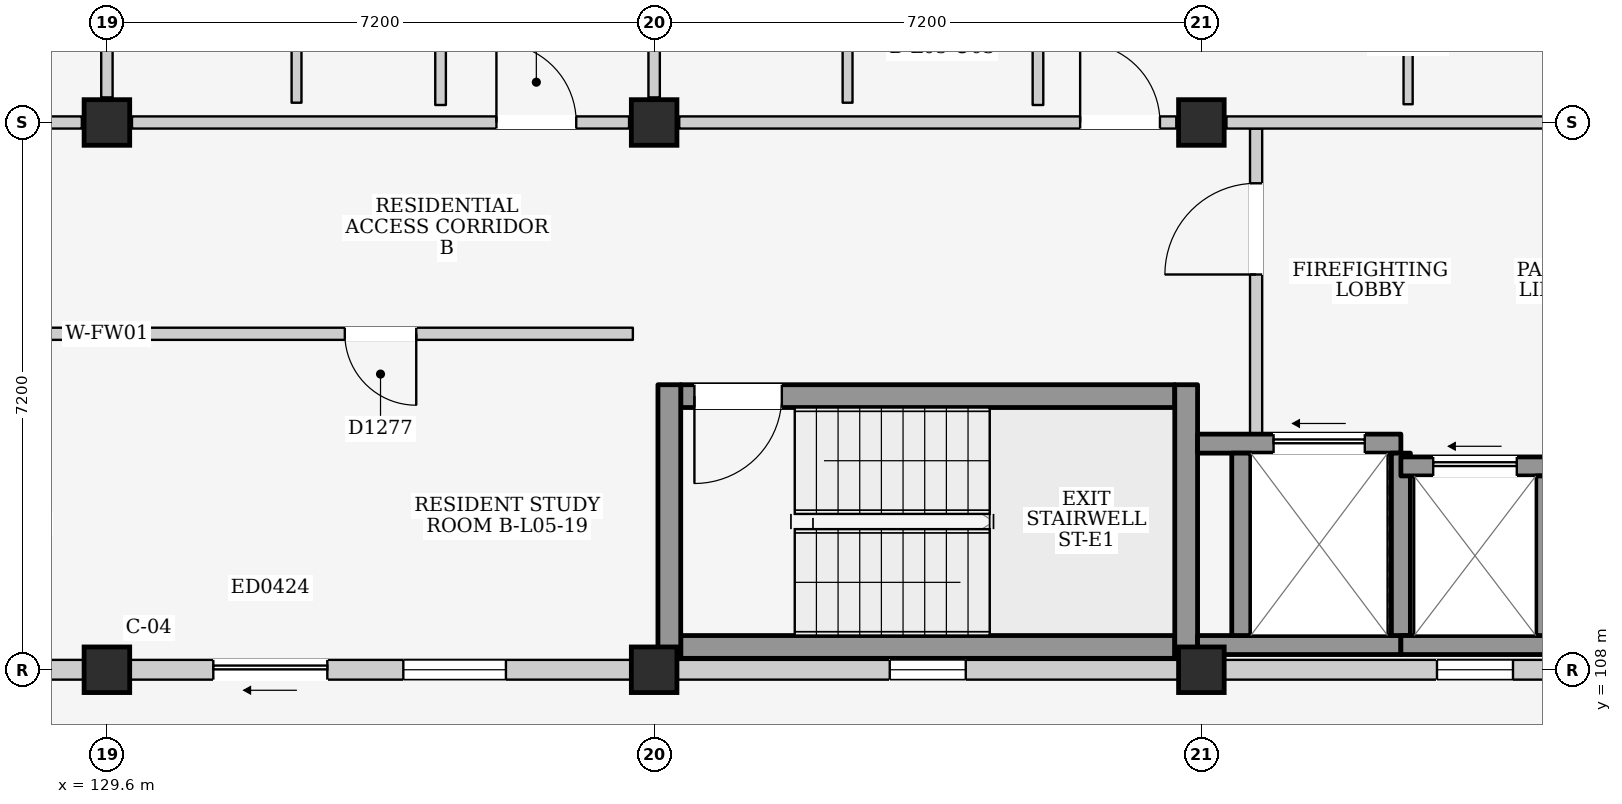
"""IFC4 building model, lengths in metres.
Left out: names, types, materials, properties, quantities, classifications, styles, units other than length and angle.
Written with IfcOpenShell. Run it as: python <this file> out.ifc"""

import sys

from ifc_helpers import new_model, si_unit, direction, frame, frame_2d, origin, origin_2d, place, context, subcontext, project, spatial, rectangle, extrude, element, fill, save


model = new_model("IFC4")
c1 = context("Model", 3, precision=1e-05, world=origin(), true_north=direction((0.0, 1.0)))
c2 = subcontext(c1, "Body", "Model", "MODEL_VIEW")
j1 = project(units=[si_unit("LENGTHUNIT", "METRE"), si_unit("PLANEANGLEUNIT", "RADIAN")], contexts=[c1])
p1 = place(None, origin())
s1 = spatial("IfcSite", under=j1, at=p1, CompositionType="ELEMENT")
p2 = place(p1, origin())
s2 = spatial("IfcBuilding", under=s1, at=p2, CompositionType="ELEMENT")
p3 = place(p2, frame((0.0, 0.0, 18.6)))
s3 = spatial("IfcBuildingStorey", under=s2, at=p3, CompositionType="ELEMENT", Elevation=18.6)
for number, where, z_axis, x_axis in (
    (1, (129.6, 108.0, 0.0), (0.0, 0.0, 1.0), (1.0, 0.0, 0.0)),
    (2, (129.6, 115.2, 0.0), (0.0, 0.0, 1.0), (1.0, 0.0, 0.0)),
    (3, (136.8, 108.0, 0.0), (0.0, 0.0, 1.0), (1.0, 0.0, 0.0)),
    (4, (136.8, 115.2, 0.0), (0.0, 0.0, 1.0), (1.0, 0.0, 0.0)),
    (5, (144.0, 108.0, 0.0), (0.0, 0.0, 1.0), (1.0, 0.0, 0.0)),
    (6, (144.0, 115.2, 0.0), (0.0, 0.0, 1.0), (1.0, 0.0, 0.0)),
):
    element("IfcColumn", number, at=place(p3, frame(where, z_axis=z_axis, x_axis=x_axis)), inside=s3, PredefinedType="COLUMN", context=c2, shape_type="SweptSolid", body=[
        extrude(rectangle(XDim=0.6, YDim=0.6, at=origin_2d()), origin(), (0.0, 0.0, 1.0), 3.3),
    ])
p4 = place(p3, frame((122.7, 108.0, 0.0), z_axis=(0.0, 0.0, 1.0), x_axis=(1.0, 0.0, 0.0)))
e7 = element("IfcWall", 7, at=p4, inside=s3, PredefinedType="ELEMENTEDWALL", context=c2, shape_type="SweptSolid", body=[
    extrude(rectangle(XDim=6.6, YDim=0.26, at=frame_2d((3.3, 0.0))), origin(), (0.0, 0.0, 1.0), 2.445),
])
p5 = place(p4, frame((1.1, 0.0, 0.0)))
e8 = element("IfcOpeningElement", 8, at=p5, cuts=e7, PredefinedType="OPENING", context=c2, shape_type="SweptSolid", body=[
    extrude(rectangle(XDim=1.5, YDim=2.12, at=frame_2d((0.75, 1.06))), frame((0.0, 0.145, 0.0), z_axis=(0.0, -1.0, 0.0), x_axis=(1.0, 0.0, 0.0)), (0.0, 0.0, 1.0), 0.29),
])
p6 = place(p4, frame((3.6, 0.0, 0.835)))
e9 = element("IfcOpeningElement", 9, at=p6, cuts=e7, PredefinedType="OPENING", context=c2, shape_type="SweptSolid", body=[
    extrude(rectangle(XDim=1.35, YDim=1.5, at=frame_2d((0.675, 0.75))), frame((0.0, 0.145, 0.0), z_axis=(0.0, -1.0, 0.0), x_axis=(1.0, 0.0, 0.0)), (0.0, 0.0, 1.0), 0.29),
])
p7 = place(p3, frame((129.9, 108.0, 0.0), z_axis=(0.0, 0.0, 1.0), x_axis=(1.0, 0.0, 0.0)))
e10 = element("IfcWall", 10, at=p7, inside=s3, PredefinedType="ELEMENTEDWALL", context=c2, shape_type="SweptSolid", body=[
    extrude(rectangle(XDim=6.6, YDim=0.26, at=frame_2d((3.3, 0.0))), origin(), (0.0, 0.0, 1.0), 2.445),
])
p8 = place(p7, frame((1.1, 0.0, 0.0)))
e11 = element("IfcOpeningElement", 11, at=p8, cuts=e10, PredefinedType="OPENING", context=c2, shape_type="SweptSolid", body=[
    extrude(rectangle(XDim=1.5, YDim=2.12, at=frame_2d((0.75, 1.06))), frame((0.0, 0.145, 0.0), z_axis=(0.0, -1.0, 0.0), x_axis=(1.0, 0.0, 0.0)), (0.0, 0.0, 1.0), 0.29),
])
p9 = place(p7, frame((3.6, 0.0, 0.835)))
e12 = element("IfcOpeningElement", 12, at=p9, cuts=e10, PredefinedType="OPENING", context=c2, shape_type="SweptSolid", body=[
    extrude(rectangle(XDim=1.35, YDim=1.5, at=frame_2d((0.675, 0.75))), frame((0.0, 0.145, 0.0), z_axis=(0.0, -1.0, 0.0), x_axis=(1.0, 0.0, 0.0)), (0.0, 0.0, 1.0), 0.29),
])
p10 = place(p3, frame((137.1, 108.0, 0.0), z_axis=(0.0, 0.0, 1.0), x_axis=(1.0, 0.0, 0.0)))
e13 = element("IfcWall", 13, at=p10, inside=s3, PredefinedType="ELEMENTEDWALL", context=c2, shape_type="SweptSolid", body=[
    extrude(rectangle(XDim=6.6, YDim=0.26, at=frame_2d((3.3, 0.0))), origin(), (0.0, 0.0, 1.0), 2.445),
])
p11 = place(p10, frame((2.8, 0.0, 1.2)))
e14 = element("IfcOpeningElement", 14, at=p11, cuts=e13, PredefinedType="OPENING", context=c2, shape_type="SweptSolid", body=[
    extrude(rectangle(XDim=1.0, YDim=0.9, at=frame_2d((0.5, 0.45))), frame((0.0, 0.145, 0.0), z_axis=(0.0, -1.0, 0.0), x_axis=(1.0, 0.0, 0.0)), (0.0, 0.0, 1.0), 0.29),
])
p12 = place(p3, frame((144.3, 108.0, 0.0), z_axis=(0.0, 0.0, 1.0), x_axis=(1.0, 0.0, 0.0)))
e15 = element("IfcWall", 15, at=p12, inside=s3, PredefinedType="ELEMENTEDWALL", context=c2, shape_type="SweptSolid", body=[
    extrude(rectangle(XDim=6.6, YDim=0.26, at=frame_2d((3.3, 0.0))), origin(), (0.0, 0.0, 1.0), 2.445),
])
p13 = place(p12, frame((2.8, 0.0, 1.2)))
e16 = element("IfcOpeningElement", 16, at=p13, cuts=e15, PredefinedType="OPENING", context=c2, shape_type="SweptSolid", body=[
    extrude(rectangle(XDim=1.0, YDim=0.9, at=frame_2d((0.5, 0.45))), frame((0.0, 0.145, 0.0), z_axis=(0.0, -1.0, 0.0), x_axis=(1.0, 0.0, 0.0)), (0.0, 0.0, 1.0), 0.29),
])
p14 = place(p3, frame((137.15, 108.3, 0.0), z_axis=(0.0, 0.0, 1.0), x_axis=(1.0, 0.0, 0.0)))
e17 = element("IfcWall", 17, at=p14, inside=s3, PredefinedType="SHEAR", context=c2, shape_type="SweptSolid", body=[
    extrude(rectangle(XDim=6.5, YDim=0.3, at=frame_2d((3.25, 0.0))), origin(), (0.0, 0.0, 1.0), 3.06),
])
p15 = place(p3, frame((137.15, 111.6, 0.0), z_axis=(0.0, 0.0, 1.0), x_axis=(1.0, 0.0, 0.0)))
e18 = element("IfcWall", 18, at=p15, inside=s3, PredefinedType="SHEAR", context=c2, shape_type="SweptSolid", body=[
    extrude(rectangle(XDim=6.5, YDim=0.3, at=frame_2d((3.25, 0.0))), origin(), (0.0, 0.0, 1.0), 3.06),
])
p16 = place(p15, frame((0.18, 0.0, 0.0)))
e19 = element("IfcOpeningElement", 19, at=p16, cuts=e18, PredefinedType="OPENING", context=c2, shape_type="SweptSolid", body=[
    extrude(rectangle(XDim=1.15, YDim=2.2, at=frame_2d((0.575, 1.1))), frame((0.0, 0.165, 0.0), z_axis=(0.0, -1.0, 0.0), x_axis=(1.0, 0.0, 0.0)), (0.0, 0.0, 1.0), 0.33),
])
for number, where, z_axis, x_axis in (
    (20, (137.0, 108.15, 0.0), (0.0, 0.0, 1.0), (0.0, 1.0, 0.0)),
    (21, (143.8, 108.15, 0.0), (0.0, 0.0, 1.0), (0.0, 1.0, 0.0)),
):
    element("IfcWall", number, at=place(p3, frame(where, z_axis=z_axis, x_axis=x_axis)), inside=s3, PredefinedType="SHEAR", context=c2, shape_type="SweptSolid", body=[
        extrude(rectangle(XDim=3.6, YDim=0.3, at=frame_2d((1.8, 0.0))), origin(), (0.0, 0.0, 1.0), 3.06),
    ])
p17 = place(p3, frame((144.72, 111.1, 0.0), z_axis=(0.0, 0.0, 1.0), x_axis=(0.0, 1.0, 0.0)))
e22 = element("IfcWall", 22, at=p17, inside=s3, PredefinedType="PARTITIONING", context=c2, shape_type="SweptSolid", body=[
    extrude(rectangle(XDim=4.02, YDim=0.16, at=frame_2d((2.01, 0.0))), origin(), (0.0, 0.0, 1.0), 3.06),
])
p18 = place(p17, frame((2.1, 0.0, 0.0)))
e23 = element("IfcOpeningElement", 23, at=p18, cuts=e22, PredefinedType="OPENING", context=c2, shape_type="SweptSolid", body=[
    extrude(rectangle(XDim=1.2, YDim=2.2, at=frame_2d((0.6, 1.1))), frame((0.0, 0.095, 0.0), z_axis=(0.0, -1.0, 0.0), x_axis=(1.0, 0.0, 0.0)), (0.0, 0.0, 1.0), 0.19),
])
p19 = place(p3, frame((143.95, 108.325, 0.0), z_axis=(0.0, 0.0, 1.0), x_axis=(1.0, 0.0, 0.0)))
e24 = element("IfcWall", 24, at=p19, inside=s3, PredefinedType="SHEAR", context=c2, shape_type="SweptSolid", body=[
    extrude(rectangle(XDim=2.675, YDim=0.25, at=frame_2d((1.337, 0.0))), origin(), (0.0, 0.0, 1.0), 3.06),
])
p20 = place(p3, frame((143.95, 110.975, 0.0), z_axis=(0.0, 0.0, 1.0), x_axis=(1.0, 0.0, 0.0)))
e25 = element("IfcWall", 25, at=p20, inside=s3, PredefinedType="SHEAR", context=c2, shape_type="SweptSolid", body=[
    extrude(rectangle(XDim=2.675, YDim=0.25, at=frame_2d((1.337, 0.0))), origin(), (0.0, 0.0, 1.0), 3.06),
])
p21 = place(p20, frame((1.0, 0.0, 0.0)))
e26 = element("IfcOpeningElement", 26, at=p21, cuts=e25, PredefinedType="OPENING", context=c2, shape_type="SweptSolid", body=[
    extrude(rectangle(XDim=1.2, YDim=2.25, at=frame_2d((0.6, 1.125))), frame((0.0, 0.14, 0.0), z_axis=(0.0, -1.0, 0.0), x_axis=(1.0, 0.0, 0.0)), (0.0, 0.0, 1.0), 0.28),
])
for number, where, z_axis, x_axis in (
    (27, (144.525, 108.45, 0.0), (0.0, 0.0, 1.0), (0.0, 1.0, 0.0)),
    (28, (146.625, 108.45, 0.0), (0.0, 0.0, 1.0), (0.0, 1.0, 0.0)),
):
    element("IfcWall", number, at=place(p3, frame(where, z_axis=z_axis, x_axis=x_axis)), inside=s3, PredefinedType="SHEAR", context=c2, shape_type="SweptSolid", body=[
        extrude(rectangle(XDim=2.4, YDim=0.25, at=frame_2d((1.2, 0.0))), origin(), (0.0, 0.0, 1.0), 3.06),
    ])
p22 = place(p3, frame((146.625, 108.325, 0.0), z_axis=(0.0, 0.0, 1.0), x_axis=(1.0, 0.0, 0.0)))
e29 = element("IfcWall", 29, at=p22, inside=s3, PredefinedType="SHEAR", context=c2, shape_type="SweptSolid", body=[
    extrude(rectangle(XDim=2.025, YDim=0.25, at=frame_2d((1.012, 0.0))), origin(), (0.0, 0.0, 1.0), 3.06),
])
p23 = place(p3, frame((146.625, 110.675, 0.0), z_axis=(0.0, 0.0, 1.0), x_axis=(1.0, 0.0, 0.0)))
e30 = element("IfcWall", 30, at=p23, inside=s3, PredefinedType="SHEAR", context=c2, shape_type="SweptSolid", body=[
    extrude(rectangle(XDim=2.025, YDim=0.25, at=frame_2d((1.012, 0.0))), origin(), (0.0, 0.0, 1.0), 3.06),
])
p24 = place(p23, frame((0.425, 0.0, 0.0)))
e31 = element("IfcOpeningElement", 31, at=p24, cuts=e30, PredefinedType="OPENING", context=c2, shape_type="SweptSolid", body=[
    extrude(rectangle(XDim=1.1, YDim=2.15, at=frame_2d((0.55, 1.075))), frame((0.0, 0.14, 0.0), z_axis=(0.0, -1.0, 0.0), x_axis=(1.0, 0.0, 0.0)), (0.0, 0.0, 1.0), 0.28),
])
p25 = place(p3, frame((148.525, 108.45, 0.0), z_axis=(0.0, 0.0, 1.0), x_axis=(0.0, 1.0, 0.0)))
e32 = element("IfcWall", 32, at=p25, inside=s3, PredefinedType="SHEAR", context=c2, shape_type="SweptSolid", body=[
    extrude(rectangle(XDim=2.1, YDim=0.25, at=frame_2d((1.05, 0.0))), origin(), (0.0, 0.0, 1.0), 3.06),
])
p26 = place(p3, frame((122.73, 115.2, 0.0), z_axis=(0.0, 0.0, 1.0), x_axis=(1.0, 0.0, 0.0)))
e33 = element("IfcWall", 33, at=p26, inside=s3, PredefinedType="PARTITIONING", context=c2, shape_type="SweptSolid", body=[
    extrude(rectangle(XDim=6.54, YDim=0.16, at=frame_2d((3.27, 0.0))), origin(), (0.0, 0.0, 1.0), 2.445),
])
p27 = place(p26, frame((4.095, 0.0, 0.0)))
e34 = element("IfcOpeningElement", 34, at=p27, cuts=e33, PredefinedType="OPENING", context=c2, shape_type="SweptSolid", body=[
    extrude(rectangle(XDim=1.05, YDim=2.15, at=frame_2d((0.525, 1.075))), frame((0.0, 0.095, 0.0), z_axis=(0.0, -1.0, 0.0), x_axis=(1.0, 0.0, 0.0)), (0.0, 0.0, 1.0), 0.19),
])
p28 = place(p3, frame((129.6, 115.53, 0.0), z_axis=(0.0, 0.0, 1.0), x_axis=(0.0, 1.0, 0.0)))
e35 = element("IfcWall", 35, at=p28, inside=s3, PredefinedType="PARTITIONING", context=c2, shape_type="SweptSolid", body=[
    extrude(rectangle(XDim=6.54, YDim=0.15, at=frame_2d((3.27, 0.0))), origin(), (0.0, 0.0, 1.0), 2.545),
])
p29 = place(p3, frame((129.93, 115.2, 0.0), z_axis=(0.0, 0.0, 1.0), x_axis=(1.0, 0.0, 0.0)))
e36 = element("IfcWall", 36, at=p29, inside=s3, PredefinedType="PARTITIONING", context=c2, shape_type="SweptSolid", body=[
    extrude(rectangle(XDim=6.54, YDim=0.16, at=frame_2d((3.27, 0.0))), origin(), (0.0, 0.0, 1.0), 2.445),
])
p30 = place(p29, frame((4.795, 0.0, 0.0)))
e37 = element("IfcOpeningElement", 37, at=p30, cuts=e36, PredefinedType="OPENING", context=c2, shape_type="SweptSolid", body=[
    extrude(rectangle(XDim=1.05, YDim=2.15, at=frame_2d((0.525, 1.075))), frame((0.0, 0.095, 0.0), z_axis=(0.0, -1.0, 0.0), x_axis=(1.0, 0.0, 0.0)), (0.0, 0.0, 1.0), 0.19),
])
p31 = place(p3, frame((136.8, 115.53, 0.0), z_axis=(0.0, 0.0, 1.0), x_axis=(0.0, 1.0, 0.0)))
e38 = element("IfcWall", 38, at=p31, inside=s3, PredefinedType="PARTITIONING", context=c2, shape_type="SweptSolid", body=[
    extrude(rectangle(XDim=6.54, YDim=0.15, at=frame_2d((3.27, 0.0))), origin(), (0.0, 0.0, 1.0), 2.545),
])
p32 = place(p3, frame((132.095, 115.46, 0.0), z_axis=(0.0, 0.0, 1.0), x_axis=(0.0, 1.0, 0.0)))
e39 = element("IfcWall", 39, at=p32, inside=s3, PredefinedType="PARTITIONING", context=c2, shape_type="SweptSolid", body=[
    extrude(rectangle(XDim=2.33, YDim=0.13, at=frame_2d((1.165, 0.0))), origin(), (0.0, 0.0, 1.0), 3.06),
])
p33 = place(p3, frame((133.99, 115.43, 0.0), z_axis=(0.0, 0.0, 1.0), x_axis=(0.0, 1.0, 0.0)))
e40 = element("IfcWall", 40, at=p33, inside=s3, PredefinedType="PARTITIONING", context=c2, shape_type="SweptSolid", body=[
    extrude(rectangle(XDim=2.35, YDim=0.14, at=frame_2d((1.175, 0.0))), origin(), (0.0, 0.0, 1.0), 3.06),
])
p34 = place(p3, frame((137.13, 115.2, 0.0), z_axis=(0.0, 0.0, 1.0), x_axis=(1.0, 0.0, 0.0)))
e41 = element("IfcWall", 41, at=p34, inside=s3, PredefinedType="PARTITIONING", context=c2, shape_type="SweptSolid", body=[
    extrude(rectangle(XDim=6.54, YDim=0.16, at=frame_2d((3.27, 0.0))), origin(), (0.0, 0.0, 1.0), 2.445),
])
p35 = place(p34, frame((5.275, 0.0, 0.0)))
e42 = element("IfcOpeningElement", 42, at=p35, cuts=e41, PredefinedType="OPENING", context=c2, shape_type="SweptSolid", body=[
    extrude(rectangle(XDim=1.05, YDim=2.15, at=frame_2d((0.525, 1.075))), frame((0.0, 0.095, 0.0), z_axis=(0.0, -1.0, 0.0), x_axis=(1.0, 0.0, 0.0)), (0.0, 0.0, 1.0), 0.19),
])
p36 = place(p3, frame((144.33, 115.2, 0.0), z_axis=(0.0, 0.0, 1.0), x_axis=(1.0, 0.0, 0.0)))
e43 = element("IfcWall", 43, at=p36, inside=s3, PredefinedType="PARTITIONING", context=c2, shape_type="SweptSolid", body=[
    extrude(rectangle(XDim=6.54, YDim=0.16, at=frame_2d((3.27, 0.0))), origin(), (0.0, 0.0, 1.0), 2.445),
])
p37 = place(p3, frame((139.345, 115.46, 0.0), z_axis=(0.0, 0.0, 1.0), x_axis=(0.0, 1.0, 0.0)))
e44 = element("IfcWall", 44, at=p37, inside=s3, PredefinedType="PARTITIONING", context=c2, shape_type="SweptSolid", body=[
    extrude(rectangle(XDim=3.04, YDim=0.13, at=frame_2d((1.52, 0.0))), origin(), (0.0, 0.0, 1.0), 3.06),
])
p38 = place(p3, frame((141.85, 115.43, 0.0), z_axis=(0.0, 0.0, 1.0), x_axis=(0.0, 1.0, 0.0)))
e45 = element("IfcWall", 45, at=p38, inside=s3, PredefinedType="PARTITIONING", context=c2, shape_type="SweptSolid", body=[
    extrude(rectangle(XDim=3.06, YDim=0.14, at=frame_2d((1.53, 0.0))), origin(), (0.0, 0.0, 1.0), 3.06),
])
p39 = place(p3, frame((146.72, 115.44, 0.0), z_axis=(0.0, 0.0, 1.0), x_axis=(0.0, 1.0, 0.0)))
e46 = element("IfcWall", 46, at=p39, inside=s3, PredefinedType="PARTITIONING", context=c2, shape_type="SweptSolid", body=[
    extrude(rectangle(XDim=3.04, YDim=0.12, at=frame_2d((1.52, 0.0))), origin(), (0.0, 0.0, 1.0), 3.06),
])
p40 = place(p39, frame((1.04, 0.0, 0.0)))
e47 = element("IfcOpeningElement", 47, at=p40, cuts=e46, PredefinedType="OPENING", context=c2, shape_type="SweptSolid", body=[
    extrude(rectangle(XDim=0.96, YDim=2.15, at=frame_2d((0.48, 1.075))), frame((0.0, 0.075, 0.0), z_axis=(0.0, -1.0, 0.0), x_axis=(1.0, 0.0, 0.0)), (0.0, 0.0, 1.0), 0.15),
])
p41 = place(p3, frame((122.68, 112.42, 0.0), z_axis=(0.0, 0.0, 1.0), x_axis=(1.0, 0.0, 0.0)))
e48 = element("IfcWall", 48, at=p41, inside=s3, PredefinedType="PARTITIONING", context=c2, shape_type="SweptSolid", body=[
    extrude(rectangle(XDim=6.64, YDim=0.16, at=frame_2d((3.32, 0.0))), origin(), (0.0, 0.0, 1.0), 3.06),
])
p42 = place(p41, frame((2.85, 0.0, 0.0)))
e49 = element("IfcOpeningElement", 49, at=p42, cuts=e48, PredefinedType="OPENING", context=c2, shape_type="SweptSolid", body=[
    extrude(rectangle(XDim=0.94, YDim=2.12, at=frame_2d((0.47, 1.06))), frame((0.0, 0.095, 0.0), z_axis=(0.0, -1.0, 0.0), x_axis=(1.0, 0.0, 0.0)), (0.0, 0.0, 1.0), 0.19),
])
p43 = place(p3, frame((129.88, 112.42, 0.0), z_axis=(0.0, 0.0, 1.0), x_axis=(1.0, 0.0, 0.0)))
e50 = element("IfcWall", 50, at=p43, inside=s3, PredefinedType="PARTITIONING", context=c2, shape_type="SweptSolid", body=[
    extrude(rectangle(XDim=6.64, YDim=0.16, at=frame_2d((3.32, 0.0))), origin(), (0.0, 0.0, 1.0), 3.06),
])
p44 = place(p43, frame((2.85, 0.0, 0.0)))
e51 = element("IfcOpeningElement", 51, at=p44, cuts=e50, PredefinedType="OPENING", context=c2, shape_type="SweptSolid", body=[
    extrude(rectangle(XDim=0.94, YDim=2.12, at=frame_2d((0.47, 1.06))), frame((0.0, 0.095, 0.0), z_axis=(0.0, -1.0, 0.0), x_axis=(1.0, 0.0, 0.0)), (0.0, 0.0, 1.0), 0.19),
])
p45 = place(p8, frame((1.5, 0.0, 0.0), z_axis=(0.0, 0.0, 1.0), x_axis=(-1.0, 0.0, 0.0)))
e52 = element("IfcDoor", 52, at=p45, inside=s3, OperationType="SLIDING_TO_LEFT", PredefinedType="DOOR", context=c2, shape_type="SweptSolid", body=[
    extrude(rectangle(XDim=1.5, YDim=2.12, at=frame_2d((0.75, 1.06))), frame((0.0, 0.025, 0.0), z_axis=(0.0, -1.0, 0.0), x_axis=(1.0, 0.0, 0.0)), (0.0, 0.0, 1.0), 0.05),
])
fill(e11, e52)
p46 = place(p9, origin())
e53 = element("IfcWindow", 53, at=p46, inside=s3, PartitioningType="SINGLE_PANEL", PredefinedType="WINDOW", context=c2, shape_type="SweptSolid", body=[
    extrude(rectangle(XDim=1.35, YDim=1.5, at=frame_2d((0.675, 0.75))), frame((0.0, 0.03, 0.0), z_axis=(0.0, -1.0, 0.0), x_axis=(1.0, 0.0, 0.0)), (0.0, 0.0, 1.0), 0.06),
])
fill(e12, e53)
p47 = place(p11, origin())
e54 = element("IfcWindow", 54, at=p47, inside=s3, PartitioningType="SINGLE_PANEL", PredefinedType="WINDOW", context=c2, shape_type="SweptSolid", body=[
    extrude(rectangle(XDim=1.0, YDim=0.9, at=frame_2d((0.5, 0.45))), frame((0.0, 0.03, 0.0), z_axis=(0.0, -1.0, 0.0), x_axis=(1.0, 0.0, 0.0)), (0.0, 0.0, 1.0), 0.06),
])
fill(e14, e54)
p48 = place(p13, origin())
e55 = element("IfcWindow", 55, at=p48, inside=s3, PartitioningType="SINGLE_PANEL", PredefinedType="WINDOW", context=c2, shape_type="SweptSolid", body=[
    extrude(rectangle(XDim=1.0, YDim=0.9, at=frame_2d((0.5, 0.45))), frame((0.0, 0.03, 0.0), z_axis=(0.0, -1.0, 0.0), x_axis=(1.0, 0.0, 0.0)), (0.0, 0.0, 1.0), 0.06),
])
fill(e16, e55)
p49 = place(p16, frame((1.15, 0.0, 0.0), z_axis=(0.0, 0.0, 1.0), x_axis=(-1.0, 0.0, 0.0)))
e56 = element("IfcDoor", 56, at=p49, inside=s3, OperationType="SINGLE_SWING_RIGHT", PredefinedType="DOOR", context=c2, shape_type="SweptSolid", body=[
    extrude(rectangle(XDim=1.15, YDim=2.2, at=frame_2d((0.575, 1.1))), frame((0.0, 0.025, 0.0), z_axis=(0.0, -1.0, 0.0), x_axis=(1.0, 0.0, 0.0)), (0.0, 0.0, 1.0), 0.05),
])
fill(e19, e56)
p50 = place(p18, origin())
e57 = element("IfcDoor", 57, at=p50, inside=s3, OperationType="SINGLE_SWING_LEFT", PredefinedType="DOOR", context=c2, shape_type="SweptSolid", body=[
    extrude(rectangle(XDim=1.2, YDim=2.2, at=frame_2d((0.6, 1.1))), frame((0.0, 0.025, 0.0), z_axis=(0.0, -1.0, 0.0), x_axis=(1.0, 0.0, 0.0)), (0.0, 0.0, 1.0), 0.05),
])
fill(e23, e57)
p51 = place(p21, origin())
e58 = element("IfcDoor", 58, at=p51, inside=s3, OperationType="SLIDING_TO_LEFT", PredefinedType="DOOR", context=c2, shape_type="SweptSolid", body=[
    extrude(rectangle(XDim=1.2, YDim=2.25, at=frame_2d((0.6, 1.125))), frame((0.0, 0.025, 0.0), z_axis=(0.0, -1.0, 0.0), x_axis=(1.0, 0.0, 0.0)), (0.0, 0.0, 1.0), 0.05),
])
fill(e26, e58)
p52 = place(p24, origin())
e59 = element("IfcDoor", 59, at=p52, inside=s3, OperationType="SLIDING_TO_LEFT", PredefinedType="DOOR", context=c2, shape_type="SweptSolid", body=[
    extrude(rectangle(XDim=1.1, YDim=2.15, at=frame_2d((0.55, 1.075))), frame((0.0, 0.025, 0.0), z_axis=(0.0, -1.0, 0.0), x_axis=(1.0, 0.0, 0.0)), (0.0, 0.0, 1.0), 0.05),
])
fill(e31, e59)
p53 = place(p30, origin())
e60 = element("IfcDoor", 60, at=p53, inside=s3, OperationType="SINGLE_SWING_LEFT", PredefinedType="DOOR", context=c2, shape_type="SweptSolid", body=[
    extrude(rectangle(XDim=1.05, YDim=2.15, at=frame_2d((0.525, 1.075))), frame((0.0, 0.025, 0.0), z_axis=(0.0, -1.0, 0.0), x_axis=(1.0, 0.0, 0.0)), (0.0, 0.0, 1.0), 0.05),
])
fill(e37, e60)
p54 = place(p35, origin())
e61 = element("IfcDoor", 61, at=p54, inside=s3, OperationType="SINGLE_SWING_LEFT", PredefinedType="DOOR", context=c2, shape_type="SweptSolid", body=[
    extrude(rectangle(XDim=1.05, YDim=2.15, at=frame_2d((0.525, 1.075))), frame((0.0, 0.025, 0.0), z_axis=(0.0, -1.0, 0.0), x_axis=(1.0, 0.0, 0.0)), (0.0, 0.0, 1.0), 0.05),
])
fill(e42, e61)
p55 = place(p44, frame((0.94, 0.0, 0.0), z_axis=(0.0, 0.0, 1.0), x_axis=(-1.0, 0.0, 0.0)))
e62 = element("IfcDoor", 62, at=p55, inside=s3, OperationType="SINGLE_SWING_LEFT", PredefinedType="DOOR", context=c2, shape_type="SweptSolid", body=[
    extrude(rectangle(XDim=0.94, YDim=2.12, at=frame_2d((0.47, 1.06))), frame((0.0, 0.025, 0.0), z_axis=(0.0, -1.0, 0.0), x_axis=(1.0, 0.0, 0.0)), (0.0, 0.0, 1.0), 0.05),
])
fill(e51, e62)
save(model, sys.argv[1])
